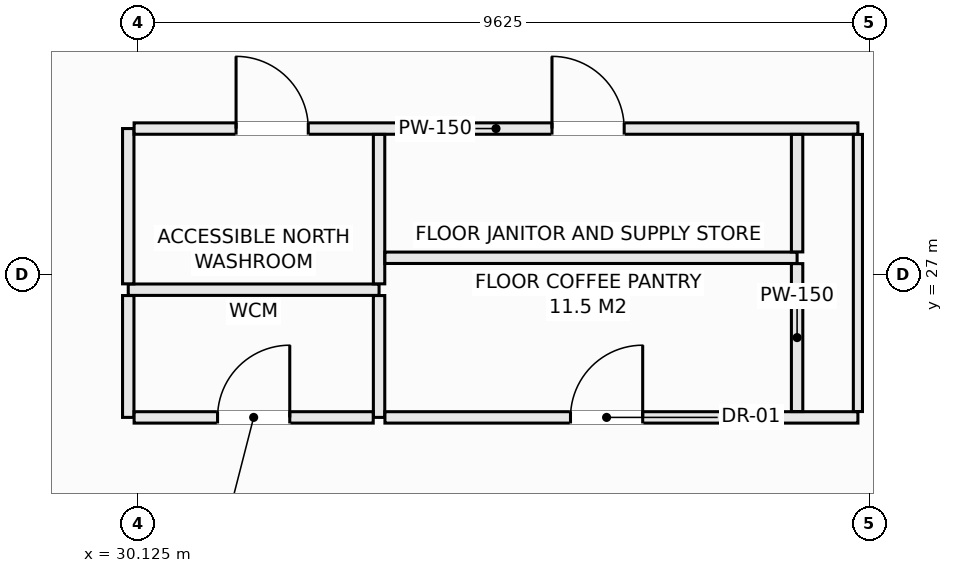
"""IFC4 building model, lengths in metres.
Left out: names, types, materials, properties, quantities, classifications, styles, units other than length and angle.
Written with IfcOpenShell. Run it as: python <this file> out.ifc"""

import sys

from ifc_helpers import new_model, si_unit, direction, frame, frame_2d, origin, place, context, subcontext, project, spatial, rectangle, extrude, element, fill, save


model = new_model("IFC4")
c1 = context("Model", 3, precision=1e-05, world=origin(), true_north=direction((0.0, 1.0)))
c2 = subcontext(c1, "Body", "Model", "MODEL_VIEW")
j1 = project(units=[si_unit("LENGTHUNIT", "METRE"), si_unit("PLANEANGLEUNIT", "RADIAN")], contexts=[c1])
p1 = place(None, origin())
s1 = spatial("IfcSite", under=j1, at=p1, CompositionType="ELEMENT")
p2 = place(p1, origin())
s2 = spatial("IfcBuilding", under=s1, at=p2, CompositionType="ELEMENT")
p3 = place(p2, frame((0.0, 0.0, 226.1)))
s3 = spatial("IfcBuildingStorey", under=s2, at=p3, CompositionType="ELEMENT", Elevation=226.1)
p4 = place(p3, frame((30.0, 26.8, 0.0), z_axis=(0.0, 0.0, 1.0), x_axis=(1.0, 0.0, 0.0)))
e1 = element("IfcWall", 1, at=p4, inside=s3, PredefinedType="PARTITIONING", context=c2, shape_type="SweptSolid", body=[
    extrude(rectangle(XDim=3.3, YDim=0.15, at=frame_2d((1.65, 0.0))), origin(), (0.0, 0.0, 1.0), 3.03),
])
p5 = place(p3, frame((30.0, 25.12, 0.0), z_axis=(0.0, 0.0, 1.0), x_axis=(0.0, 1.0, 0.0)))
e2 = element("IfcWall", 2, at=p5, inside=s3, PredefinedType="PARTITIONING", context=c2, shape_type="SweptSolid", body=[
    extrude(rectangle(XDim=1.603, YDim=0.15, at=frame_2d((0.801, 0.0))), origin(), (0.0, 0.0, 1.0), 3.03),
])
p6 = place(p3, frame((30.0, 26.877, 0.0), z_axis=(0.0, 0.0, 1.0), x_axis=(0.0, 1.0, 0.0)))
e3 = element("IfcWall", 3, at=p6, inside=s3, PredefinedType="PARTITIONING", context=c2, shape_type="SweptSolid", body=[
    extrude(rectangle(XDim=2.043, YDim=0.15, at=frame_2d((1.021, 0.0))), origin(), (0.0, 0.0, 1.0), 3.03),
])
p7 = place(p3, frame((30.077, 28.92, 0.0), z_axis=(0.0, 0.0, 1.0), x_axis=(1.0, 0.0, 0.0)))
e4 = element("IfcWall", 4, at=p7, inside=s3, PredefinedType="PARTITIONING", context=c2, shape_type="SweptSolid", body=[
    extrude(rectangle(XDim=9.523, YDim=0.15, at=frame_2d((4.762, 0.0))), origin(), (0.0, 0.0, 1.0), 3.03),
])
p8 = place(p7, frame((1.342, 0.0, 0.0)))
e5 = element("IfcOpeningElement", 5, at=p8, cuts=e4, PredefinedType="OPENING", context=c2, shape_type="SweptSolid", body=[
    extrude(rectangle(XDim=0.95, YDim=2.1, at=frame_2d((0.475, 1.05))), frame((0.0, 0.085, 0.0), z_axis=(0.0, -1.0, 0.0), x_axis=(1.0, 0.0, 0.0)), (0.0, 0.0, 1.0), 0.17),
])
p9 = place(p7, frame((5.498, 0.0, 0.0)))
e6 = element("IfcOpeningElement", 6, at=p9, cuts=e4, PredefinedType="OPENING", context=c2, shape_type="SweptSolid", body=[
    extrude(rectangle(XDim=0.95, YDim=2.1, at=frame_2d((0.475, 1.05))), frame((0.0, 0.085, 0.0), z_axis=(0.0, -1.0, 0.0), x_axis=(1.0, 0.0, 0.0)), (0.0, 0.0, 1.0), 0.17),
])
p10 = place(p3, frame((33.3, 25.12, 0.0), z_axis=(0.0, 0.0, 1.0), x_axis=(0.0, 1.0, 0.0)))
e7 = element("IfcWall", 7, at=p10, inside=s3, PredefinedType="PARTITIONING", context=c2, shape_type="SweptSolid", body=[
    extrude(rectangle(XDim=1.603, YDim=0.15, at=frame_2d((0.801, 0.0))), origin(), (0.0, 0.0, 1.0), 3.03),
])
p11 = place(p3, frame((33.3, 26.877, 0.0), z_axis=(0.0, 0.0, 1.0), x_axis=(0.0, 1.0, 0.0)))
e8 = element("IfcWall", 8, at=p11, inside=s3, PredefinedType="PARTITIONING", context=c2, shape_type="SweptSolid", body=[
    extrude(rectangle(XDim=1.966, YDim=0.15, at=frame_2d((0.983, 0.0))), origin(), (0.0, 0.0, 1.0), 3.03),
])
p12 = place(p3, frame((30.077, 25.12, 0.0), z_axis=(0.0, 0.0, 1.0), x_axis=(1.0, 0.0, 0.0)))
e9 = element("IfcWall", 9, at=p12, inside=s3, PredefinedType="PARTITIONING", context=c2, shape_type="SweptSolid", body=[
    extrude(rectangle(XDim=3.146, YDim=0.15, at=frame_2d((1.573, 0.0))), origin(), (0.0, 0.0, 1.0), 3.03),
])
p13 = place(p12, frame((1.098, 0.0, 0.0)))
e10 = element("IfcOpeningElement", 10, at=p13, cuts=e9, PredefinedType="OPENING", context=c2, shape_type="SweptSolid", body=[
    extrude(rectangle(XDim=0.95, YDim=2.1, at=frame_2d((0.475, 1.05))), frame((0.0, 0.085, 0.0), z_axis=(0.0, -1.0, 0.0), x_axis=(1.0, 0.0, 0.0)), (0.0, 0.0, 1.0), 0.17),
])
p14 = place(p3, frame((33.377, 25.12, 0.0), z_axis=(0.0, 0.0, 1.0), x_axis=(1.0, 0.0, 0.0)))
e11 = element("IfcWall", 11, at=p14, inside=s3, PredefinedType="PARTITIONING", context=c2, shape_type="SweptSolid", body=[
    extrude(rectangle(XDim=6.223, YDim=0.15, at=frame_2d((3.112, 0.0))), origin(), (0.0, 0.0, 1.0), 3.03),
])
p15 = place(p14, frame((2.441, 0.0, 0.0)))
e12 = element("IfcOpeningElement", 12, at=p15, cuts=e11, PredefinedType="OPENING", context=c2, shape_type="SweptSolid", body=[
    extrude(rectangle(XDim=0.95, YDim=2.1, at=frame_2d((0.475, 1.05))), frame((0.0, 0.085, 0.0), z_axis=(0.0, -1.0, 0.0), x_axis=(1.0, 0.0, 0.0)), (0.0, 0.0, 1.0), 0.17),
])
p16 = place(p3, frame((33.377, 27.22, 0.0), z_axis=(0.0, 0.0, 1.0), x_axis=(1.0, 0.0, 0.0)))
e13 = element("IfcWall", 13, at=p16, inside=s3, PredefinedType="PARTITIONING", context=c2, shape_type="SweptSolid", body=[
    extrude(rectangle(XDim=5.423, YDim=0.15, at=frame_2d((2.711, 0.0))), origin(), (0.0, 0.0, 1.0), 3.03),
])
p17 = place(p3, frame((38.8, 25.197, 0.0), z_axis=(0.0, 0.0, 1.0), x_axis=(0.0, 1.0, 0.0)))
e14 = element("IfcWall", 14, at=p17, inside=s3, PredefinedType="PARTITIONING", context=c2, shape_type="SweptSolid", body=[
    extrude(rectangle(XDim=1.946, YDim=0.15, at=frame_2d((0.973, 0.0))), origin(), (0.0, 0.0, 1.0), 3.03),
])
p18 = place(p3, frame((38.8, 27.297, 0.0), z_axis=(0.0, 0.0, 1.0), x_axis=(0.0, 1.0, 0.0)))
e15 = element("IfcWall", 15, at=p18, inside=s3, PredefinedType="PARTITIONING", context=c2, shape_type="SweptSolid", body=[
    extrude(rectangle(XDim=1.546, YDim=0.15, at=frame_2d((0.773, 0.0))), origin(), (0.0, 0.0, 1.0), 3.03),
])
p19 = place(p3, frame((39.6, 25.197, 0.0), z_axis=(0.0, 0.0, 1.0), x_axis=(0.0, 1.0, 0.0)))
e16 = element("IfcWall", 16, at=p19, inside=s3, PredefinedType="PARTITIONING", context=c2, shape_type="SweptSolid", body=[
    extrude(rectangle(XDim=3.646, YDim=0.12, at=frame_2d((1.823, 0.0))), origin(), (0.0, 0.0, 1.0), 3.03),
])
p20 = place(p8, origin())
e17 = element("IfcDoor", 17, at=p20, inside=s3, OperationType="SINGLE_SWING_LEFT", PredefinedType="DOOR", context=c2, shape_type="SweptSolid", body=[
    extrude(rectangle(XDim=0.95, YDim=2.1, at=frame_2d((0.475, 1.05))), frame((0.0, 0.025, 0.0), z_axis=(0.0, -1.0, 0.0), x_axis=(1.0, 0.0, 0.0)), (0.0, 0.0, 1.0), 0.05),
])
fill(e5, e17)
p21 = place(p13, origin())
e18 = element("IfcDoor", 18, at=p21, inside=s3, OperationType="SINGLE_SWING_RIGHT", PredefinedType="DOOR", context=c2, shape_type="SweptSolid", body=[
    extrude(rectangle(XDim=0.95, YDim=2.1, at=frame_2d((0.475, 1.05))), frame((0.0, 0.025, 0.0), z_axis=(0.0, -1.0, 0.0), x_axis=(1.0, 0.0, 0.0)), (0.0, 0.0, 1.0), 0.05),
])
fill(e10, e18)
p22 = place(p9, origin())
e19 = element("IfcDoor", 19, at=p22, inside=s3, OperationType="SINGLE_SWING_LEFT", PredefinedType="DOOR", context=c2, shape_type="SweptSolid", body=[
    extrude(rectangle(XDim=0.95, YDim=2.1, at=frame_2d((0.475, 1.05))), frame((0.0, 0.025, 0.0), z_axis=(0.0, -1.0, 0.0), x_axis=(1.0, 0.0, 0.0)), (0.0, 0.0, 1.0), 0.05),
])
fill(e6, e19)
p23 = place(p15, origin())
e20 = element("IfcDoor", 20, at=p23, inside=s3, OperationType="SINGLE_SWING_RIGHT", PredefinedType="DOOR", context=c2, shape_type="SweptSolid", body=[
    extrude(rectangle(XDim=0.95, YDim=2.1, at=frame_2d((0.475, 1.05))), frame((0.0, 0.025, 0.0), z_axis=(0.0, -1.0, 0.0), x_axis=(1.0, 0.0, 0.0)), (0.0, 0.0, 1.0), 0.05),
])
fill(e12, e20)
save(model, sys.argv[1])
